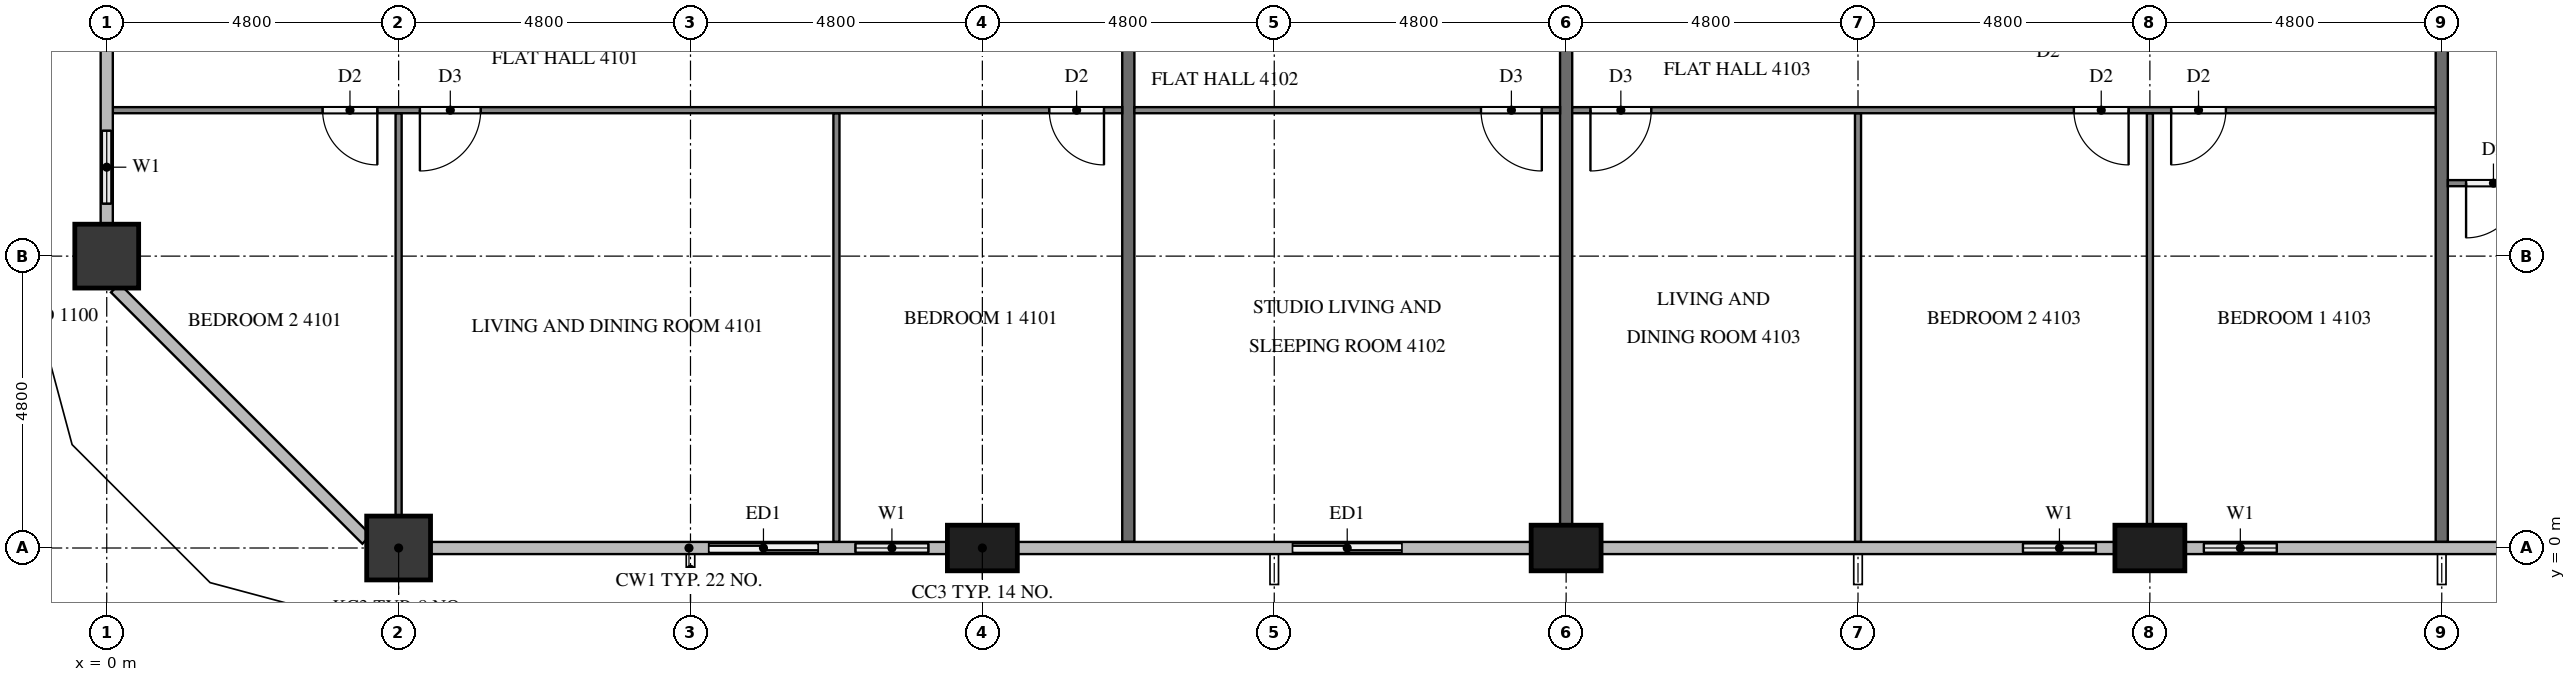
"""IFC4 building model, lengths in metres.
Left out: names, types, materials, properties, quantities, classifications, styles, units other than length and angle.
Written with IfcOpenShell. Run it as: python <this file> out.ifc"""

import sys

from ifc_helpers import new_model, si_unit, direction, frame, frame_2d, origin, origin_2d, place, context, subcontext, project, spatial, rectangle, extrude, element, fill, save


model = new_model("IFC4")
c1 = context("Model", 3, precision=1e-05, world=origin(), true_north=direction((0.0, 1.0)))
c2 = subcontext(c1, "Body", "Model", "MODEL_VIEW")
j1 = project(units=[si_unit("LENGTHUNIT", "METRE"), si_unit("PLANEANGLEUNIT", "RADIAN")], contexts=[c1])
p1 = place(None, origin())
s1 = spatial("IfcSite", under=j1, at=p1, CompositionType="ELEMENT")
p2 = place(p1, origin())
s2 = spatial("IfcBuilding", under=s1, at=p2, CompositionType="ELEMENT")
p3 = place(p2, frame((0.0, 0.0, 159.5)))
s3 = spatial("IfcBuildingStorey", under=s2, at=p3, CompositionType="ELEMENT", Elevation=159.5)
p4 = place(p3, frame((4.8, 0.0, 0.0), z_axis=(0.0, 0.0, 1.0), x_axis=(1.0, 0.0, 0.0)))
e1 = element("IfcColumn", 1, at=p4, inside=s3, PredefinedType="COLUMN", context=c2, shape_type="SweptSolid", body=[
    extrude(rectangle(XDim=1.05, YDim=1.05, at=origin_2d()), origin(), (0.0, 0.0, 1.0), 3.2),
])
for number, where, z_axis, x_axis in (
    (2, (14.4, 0.0, 0.0), (0.0, 0.0, 1.0), (1.0, 0.0, 0.0)),
    (3, (24.0, 0.0, 0.0), (0.0, 0.0, 1.0), (1.0, 0.0, 0.0)),
    (4, (33.6, 0.0, 0.0), (0.0, 0.0, 1.0), (1.0, 0.0, 0.0)),
):
    element("IfcColumn", number, at=place(p3, frame(where, z_axis=z_axis, x_axis=x_axis)), inside=s3, PredefinedType="COLUMN", context=c2, shape_type="SweptSolid", body=[
        extrude(rectangle(XDim=1.15, YDim=0.75, at=origin_2d()), origin(), (0.0, 0.0, 1.0), 3.2),
    ])
p5 = place(p3, frame((0.0, 4.8, 0.0), z_axis=(0.0, 0.0, 1.0), x_axis=(1.0, 0.0, 0.0)))
e5 = element("IfcColumn", 5, at=p5, inside=s3, PredefinedType="COLUMN", context=c2, shape_type="SweptSolid", body=[
    extrude(rectangle(XDim=1.05, YDim=1.05, at=origin_2d()), origin(), (0.0, 0.0, 1.0), 3.2),
])
p6 = place(p3, frame((9.6, 0.0, 0.0), z_axis=(0.0, 0.0, 1.0), x_axis=(1.0, 0.0, 0.0)))
e6 = element("IfcWall", 6, at=p6, inside=s3, PredefinedType="SOLIDWALL", context=c2, shape_type="SweptSolid", body=[
    extrude(rectangle(XDim=4.225, YDim=0.15, at=frame_2d((2.112, 0.0))), origin(), (0.0, 0.0, 1.0), 3.2),
])
p7 = place(p6, frame((0.3, 0.0, 0.0)))
e7 = element("IfcOpeningElement", 7, at=p7, cuts=e6, PredefinedType="OPENING", context=c2, shape_type="SweptSolid", body=[
    extrude(rectangle(XDim=1.8, YDim=2.4, at=frame_2d((0.9, 1.2))), frame((0.0, 0.085, 0.0), z_axis=(0.0, -1.0, 0.0), x_axis=(1.0, 0.0, 0.0)), (0.0, 0.0, 1.0), 0.17),
])
p8 = place(p6, frame((2.712, 0.0, 0.9)))
e8 = element("IfcOpeningElement", 8, at=p8, cuts=e6, PredefinedType="OPENING", context=c2, shape_type="SweptSolid", body=[
    extrude(rectangle(XDim=1.2, YDim=1.4, at=frame_2d((0.6, 0.7))), frame((0.0, 0.085, 0.0), z_axis=(0.0, -1.0, 0.0), x_axis=(1.0, 0.0, 0.0)), (0.0, 0.0, 1.0), 0.17),
])
p9 = place(p3, frame((19.2, 0.0, 0.0), z_axis=(0.0, 0.0, 1.0), x_axis=(1.0, 0.0, 0.0)))
e9 = element("IfcWall", 9, at=p9, inside=s3, PredefinedType="SOLIDWALL", context=c2, shape_type="SweptSolid", body=[
    extrude(rectangle(XDim=2.4, YDim=0.15, at=frame_2d((1.2, 0.0))), origin(), (0.0, 0.0, 1.0), 3.2),
])
p10 = place(p9, frame((0.3, 0.0, 0.0)))
e10 = element("IfcOpeningElement", 10, at=p10, cuts=e9, PredefinedType="OPENING", context=c2, shape_type="SweptSolid", body=[
    extrude(rectangle(XDim=1.8, YDim=2.4, at=frame_2d((0.9, 1.2))), frame((0.0, 0.085, 0.0), z_axis=(0.0, -1.0, 0.0), x_axis=(1.0, 0.0, 0.0)), (0.0, 0.0, 1.0), 0.17),
])
p11 = place(p3, frame((31.2, 0.0, 0.0), z_axis=(0.0, 0.0, 1.0), x_axis=(1.0, 0.0, 0.0)))
e11 = element("IfcWall", 11, at=p11, inside=s3, PredefinedType="SOLIDWALL", context=c2, shape_type="SweptSolid", body=[
    extrude(rectangle(XDim=1.825, YDim=0.15, at=frame_2d((0.913, 0.0))), origin(), (0.0, 0.0, 1.0), 3.2),
])
p12 = place(p11, frame((0.312, 0.0, 0.9)))
e12 = element("IfcOpeningElement", 12, at=p12, cuts=e11, PredefinedType="OPENING", context=c2, shape_type="SweptSolid", body=[
    extrude(rectangle(XDim=1.2, YDim=1.4, at=frame_2d((0.6, 0.7))), frame((0.0, 0.085, 0.0), z_axis=(0.0, -1.0, 0.0), x_axis=(1.0, 0.0, 0.0)), (0.0, 0.0, 1.0), 0.17),
])
p13 = place(p3, frame((34.175, 0.0, 0.0), z_axis=(0.0, 0.0, 1.0), x_axis=(1.0, 0.0, 0.0)))
e13 = element("IfcWall", 13, at=p13, inside=s3, PredefinedType="SOLIDWALL", context=c2, shape_type="SweptSolid", body=[
    extrude(rectangle(XDim=1.825, YDim=0.15, at=frame_2d((0.913, 0.0))), origin(), (0.0, 0.0, 1.0), 3.2),
])
p14 = place(p13, frame((0.312, 0.0, 0.9)))
e14 = element("IfcOpeningElement", 14, at=p14, cuts=e13, PredefinedType="OPENING", context=c2, shape_type="SweptSolid", body=[
    extrude(rectangle(XDim=1.2, YDim=1.4, at=frame_2d((0.6, 0.7))), frame((0.0, 0.085, 0.0), z_axis=(0.0, -1.0, 0.0), x_axis=(1.0, 0.0, 0.0)), (0.0, 0.0, 1.0), 0.17),
])
p15 = place(p3, frame((0.0, 7.2, 0.0), z_axis=(0.0, 0.0, 1.0), x_axis=(0.0, -1.0, 0.0)))
e15 = element("IfcWall", 15, at=p15, inside=s3, PredefinedType="SOLIDWALL", context=c2, shape_type="SweptSolid", body=[
    extrude(rectangle(XDim=1.875, YDim=0.15, at=frame_2d((0.938, 0.0))), origin(), (0.0, 0.0, 1.0), 3.2),
])
p16 = place(p15, frame((0.337, 0.0, 0.9)))
e16 = element("IfcOpeningElement", 16, at=p16, cuts=e15, PredefinedType="OPENING", context=c2, shape_type="SweptSolid", body=[
    extrude(rectangle(XDim=1.2, YDim=1.4, at=frame_2d((0.6, 0.7))), frame((0.0, 0.085, 0.0), z_axis=(0.0, -1.0, 0.0), x_axis=(1.0, 0.0, 0.0)), (0.0, 0.0, 1.0), 0.17),
])
p17 = place(p3, frame((16.8, 11.9, 0.0), z_axis=(0.0, 0.0, 1.0), x_axis=(0.0, -1.0, 0.0)))
e17 = element("IfcWall", 17, at=p17, inside=s3, PredefinedType="PARTITIONING", context=c2, shape_type="SweptSolid", body=[
    extrude(rectangle(XDim=11.8, YDim=0.2, at=frame_2d((5.9, 0.0))), origin(), (0.0, 0.0, 1.0), 3.2),
])
p18 = place(p3, frame((24.0, 11.9, 0.0), z_axis=(0.0, 0.0, 1.0), x_axis=(0.0, -1.0, 0.0)))
e18 = element("IfcWall", 18, at=p18, inside=s3, PredefinedType="PARTITIONING", context=c2, shape_type="SweptSolid", body=[
    extrude(rectangle(XDim=11.525, YDim=0.2, at=frame_2d((5.762, 0.0))), origin(), (0.0, 0.0, 1.0), 3.2),
])
p19 = place(p3, frame((38.4, 11.9, 0.0), z_axis=(0.0, 0.0, 1.0), x_axis=(0.0, -1.0, 0.0)))
e19 = element("IfcWall", 19, at=p19, inside=s3, PredefinedType="PARTITIONING", context=c2, shape_type="SweptSolid", body=[
    extrude(rectangle(XDim=11.8, YDim=0.2, at=frame_2d((5.9, 0.0))), origin(), (0.0, 0.0, 1.0), 3.2),
])
p20 = place(p3, frame((12.0, 7.15, 0.0), z_axis=(0.0, 0.0, 1.0), x_axis=(0.0, -1.0, 0.0)))
e20 = element("IfcWall", 20, at=p20, inside=s3, PredefinedType="PARTITIONING", context=c2, shape_type="SweptSolid", body=[
    extrude(rectangle(XDim=7.05, YDim=0.1, at=frame_2d((3.525, 0.0))), origin(), (0.0, 0.0, 1.0), 3.2),
])
p21 = place(p3, frame((4.8, 7.15, 0.0), z_axis=(0.0, 0.0, 1.0), x_axis=(0.0, -1.0, 0.0)))
e21 = element("IfcWall", 21, at=p21, inside=s3, PredefinedType="PARTITIONING", context=c2, shape_type="SweptSolid", body=[
    extrude(rectangle(XDim=6.625, YDim=0.1, at=frame_2d((3.312, 0.0))), origin(), (0.0, 0.0, 1.0), 3.2),
])
p22 = place(p3, frame((16.7, 7.2, 0.0), z_axis=(0.0, 0.0, 1.0), x_axis=(-1.0, 0.0, 0.0)))
e22 = element("IfcWall", 22, at=p22, inside=s3, PredefinedType="PARTITIONING", context=c2, shape_type="SweptSolid", body=[
    extrude(rectangle(XDim=16.6, YDim=0.1, at=frame_2d((8.3, 0.0))), origin(), (0.0, 0.0, 1.0), 3.2),
])
p23 = place(p22, frame((0.3, 0.0, 0.0)))
e23 = element("IfcOpeningElement", 23, at=p23, cuts=e22, PredefinedType="OPENING", context=c2, shape_type="SweptSolid", body=[
    extrude(rectangle(XDim=0.9, YDim=2.1, at=frame_2d((0.45, 1.05))), frame((0.0, 0.06, 0.0), z_axis=(0.0, -1.0, 0.0), x_axis=(1.0, 0.0, 0.0)), (0.0, 0.0, 1.0), 0.12),
])
p24 = place(p22, frame((10.55, 0.0, 0.0)))
e24 = element("IfcOpeningElement", 24, at=p24, cuts=e22, PredefinedType="OPENING", context=c2, shape_type="SweptSolid", body=[
    extrude(rectangle(XDim=1.0, YDim=2.1, at=frame_2d((0.5, 1.05))), frame((0.0, 0.06, 0.0), z_axis=(0.0, -1.0, 0.0), x_axis=(1.0, 0.0, 0.0)), (0.0, 0.0, 1.0), 0.12),
])
p25 = place(p22, frame((12.25, 0.0, 0.0)))
e25 = element("IfcOpeningElement", 25, at=p25, cuts=e22, PredefinedType="OPENING", context=c2, shape_type="SweptSolid", body=[
    extrude(rectangle(XDim=0.9, YDim=2.1, at=frame_2d((0.45, 1.05))), frame((0.0, 0.06, 0.0), z_axis=(0.0, -1.0, 0.0), x_axis=(1.0, 0.0, 0.0)), (0.0, 0.0, 1.0), 0.12),
])
p26 = place(p3, frame((23.9, 7.2, 0.0), z_axis=(0.0, 0.0, 1.0), x_axis=(-1.0, 0.0, 0.0)))
e26 = element("IfcWall", 26, at=p26, inside=s3, PredefinedType="PARTITIONING", context=c2, shape_type="SweptSolid", body=[
    extrude(rectangle(XDim=7.0, YDim=0.1, at=frame_2d((3.5, 0.0))), origin(), (0.0, 0.0, 1.0), 3.2),
])
p27 = place(p26, frame((0.3, 0.0, 0.0)))
e27 = element("IfcOpeningElement", 27, at=p27, cuts=e26, PredefinedType="OPENING", context=c2, shape_type="SweptSolid", body=[
    extrude(rectangle(XDim=1.0, YDim=2.1, at=frame_2d((0.5, 1.05))), frame((0.0, 0.06, 0.0), z_axis=(0.0, -1.0, 0.0), x_axis=(1.0, 0.0, 0.0)), (0.0, 0.0, 1.0), 0.12),
])
p28 = place(p3, frame((33.6, 7.15, 0.0), z_axis=(0.0, 0.0, 1.0), x_axis=(0.0, -1.0, 0.0)))
e28 = element("IfcWall", 28, at=p28, inside=s3, PredefinedType="PARTITIONING", context=c2, shape_type="SweptSolid", body=[
    extrude(rectangle(XDim=6.775, YDim=0.1, at=frame_2d((3.387, 0.0))), origin(), (0.0, 0.0, 1.0), 3.2),
])
p29 = place(p3, frame((28.8, 7.15, 0.0), z_axis=(0.0, 0.0, 1.0), x_axis=(0.0, -1.0, 0.0)))
e29 = element("IfcWall", 29, at=p29, inside=s3, PredefinedType="PARTITIONING", context=c2, shape_type="SweptSolid", body=[
    extrude(rectangle(XDim=7.05, YDim=0.1, at=frame_2d((3.525, 0.0))), origin(), (0.0, 0.0, 1.0), 3.2),
])
p30 = place(p3, frame((38.3, 7.2, 0.0), z_axis=(0.0, 0.0, 1.0), x_axis=(-1.0, 0.0, 0.0)))
e30 = element("IfcWall", 30, at=p30, inside=s3, PredefinedType="PARTITIONING", context=c2, shape_type="SweptSolid", body=[
    extrude(rectangle(XDim=14.2, YDim=0.1, at=frame_2d((7.1, 0.0))), origin(), (0.0, 0.0, 1.0), 3.2),
])
p31 = place(p30, frame((3.45, 0.0, 0.0)))
e31 = element("IfcOpeningElement", 31, at=p31, cuts=e30, PredefinedType="OPENING", context=c2, shape_type="SweptSolid", body=[
    extrude(rectangle(XDim=0.9, YDim=2.1, at=frame_2d((0.45, 1.05))), frame((0.0, 0.06, 0.0), z_axis=(0.0, -1.0, 0.0), x_axis=(1.0, 0.0, 0.0)), (0.0, 0.0, 1.0), 0.12),
])
p32 = place(p30, frame((5.05, 0.0, 0.0)))
e32 = element("IfcOpeningElement", 32, at=p32, cuts=e30, PredefinedType="OPENING", context=c2, shape_type="SweptSolid", body=[
    extrude(rectangle(XDim=0.9, YDim=2.1, at=frame_2d((0.45, 1.05))), frame((0.0, 0.06, 0.0), z_axis=(0.0, -1.0, 0.0), x_axis=(1.0, 0.0, 0.0)), (0.0, 0.0, 1.0), 0.12),
])
p33 = place(p30, frame((12.9, 0.0, 0.0)))
e33 = element("IfcOpeningElement", 33, at=p33, cuts=e30, PredefinedType="OPENING", context=c2, shape_type="SweptSolid", body=[
    extrude(rectangle(XDim=1.0, YDim=2.1, at=frame_2d((0.5, 1.05))), frame((0.0, 0.06, 0.0), z_axis=(0.0, -1.0, 0.0), x_axis=(1.0, 0.0, 0.0)), (0.0, 0.0, 1.0), 0.12),
])
p34 = place(p3, frame((57.5, 6.0, 0.0), z_axis=(0.0, 0.0, 1.0), x_axis=(-1.0, 0.0, 0.0)))
e34 = element("IfcWall", 34, at=p34, inside=s3, PredefinedType="PARTITIONING", context=c2, shape_type="SweptSolid", body=[
    extrude(rectangle(XDim=19.0, YDim=0.1, at=frame_2d((9.5, 0.0))), origin(), (0.0, 0.0, 1.0), 3.2),
])
p35 = place(p34, frame((17.8, 0.0, 0.0)))
e35 = element("IfcOpeningElement", 35, at=p35, cuts=e34, PredefinedType="OPENING", context=c2, shape_type="SweptSolid", body=[
    extrude(rectangle(XDim=0.9, YDim=2.1, at=frame_2d((0.45, 1.05))), frame((0.0, 0.06, 0.0), z_axis=(0.0, -1.0, 0.0), x_axis=(1.0, 0.0, 0.0)), (0.0, 0.0, 1.0), 0.12),
])
p36 = place(p34, frame((9.85, 0.0, 0.0)))
e36 = element("IfcOpeningElement", 36, at=p36, cuts=e34, PredefinedType="OPENING", context=c2, shape_type="SweptSolid", body=[
    extrude(rectangle(XDim=1.0, YDim=2.1, at=frame_2d((0.5, 1.05))), frame((0.0, 0.06, 0.0), z_axis=(0.0, -1.0, 0.0), x_axis=(1.0, 0.0, 0.0)), (0.0, 0.0, 1.0), 0.12),
])
p37 = place(p34, frame((8.25, 0.0, 0.0)))
e37 = element("IfcOpeningElement", 37, at=p37, cuts=e34, PredefinedType="OPENING", context=c2, shape_type="SweptSolid", body=[
    extrude(rectangle(XDim=0.9, YDim=2.1, at=frame_2d((0.45, 1.05))), frame((0.0, 0.06, 0.0), z_axis=(0.0, -1.0, 0.0), x_axis=(1.0, 0.0, 0.0)), (0.0, 0.0, 1.0), 0.12),
])
p38 = place(p34, frame((0.5, 0.0, 0.0)))
e38 = element("IfcOpeningElement", 38, at=p38, cuts=e34, PredefinedType="OPENING", context=c2, shape_type="SweptSolid", body=[
    extrude(rectangle(XDim=0.9, YDim=2.1, at=frame_2d((0.45, 1.05))), frame((0.0, 0.06, 0.0), z_axis=(0.0, -1.0, 0.0), x_axis=(1.0, 0.0, 0.0)), (0.0, 0.0, 1.0), 0.12),
])
p39 = place(p7, origin())
e39 = element("IfcDoor", 39, at=p39, inside=s3, OperationType="SLIDING_TO_LEFT", PredefinedType="DOOR", context=c2, shape_type="SweptSolid", body=[
    extrude(rectangle(XDim=1.8, YDim=2.4, at=frame_2d((0.9, 1.2))), frame((0.0, 0.025, 0.0), z_axis=(0.0, -1.0, 0.0), x_axis=(1.0, 0.0, 0.0)), (0.0, 0.0, 1.0), 0.05),
])
fill(e7, e39)
p40 = place(p8, origin())
e40 = element("IfcWindow", 40, at=p40, inside=s3, PartitioningType="SINGLE_PANEL", PredefinedType="WINDOW", context=c2, shape_type="SweptSolid", body=[
    extrude(rectangle(XDim=1.2, YDim=1.4, at=frame_2d((0.6, 0.7))), frame((0.0, 0.03, 0.0), z_axis=(0.0, -1.0, 0.0), x_axis=(1.0, 0.0, 0.0)), (0.0, 0.0, 1.0), 0.06),
])
fill(e8, e40)
p41 = place(p10, origin())
e41 = element("IfcDoor", 41, at=p41, inside=s3, OperationType="SLIDING_TO_RIGHT", PredefinedType="DOOR", context=c2, shape_type="SweptSolid", body=[
    extrude(rectangle(XDim=1.8, YDim=2.4, at=frame_2d((0.9, 1.2))), frame((0.0, 0.025, 0.0), z_axis=(0.0, -1.0, 0.0), x_axis=(1.0, 0.0, 0.0)), (0.0, 0.0, 1.0), 0.05),
])
fill(e10, e41)
p42 = place(p12, origin())
e42 = element("IfcWindow", 42, at=p42, inside=s3, PartitioningType="SINGLE_PANEL", PredefinedType="WINDOW", context=c2, shape_type="SweptSolid", body=[
    extrude(rectangle(XDim=1.2, YDim=1.4, at=frame_2d((0.6, 0.7))), frame((0.0, 0.03, 0.0), z_axis=(0.0, -1.0, 0.0), x_axis=(1.0, 0.0, 0.0)), (0.0, 0.0, 1.0), 0.06),
])
fill(e12, e42)
p43 = place(p14, origin())
e43 = element("IfcWindow", 43, at=p43, inside=s3, PartitioningType="SINGLE_PANEL", PredefinedType="WINDOW", context=c2, shape_type="SweptSolid", body=[
    extrude(rectangle(XDim=1.2, YDim=1.4, at=frame_2d((0.6, 0.7))), frame((0.0, 0.03, 0.0), z_axis=(0.0, -1.0, 0.0), x_axis=(1.0, 0.0, 0.0)), (0.0, 0.0, 1.0), 0.06),
])
fill(e14, e43)
p44 = place(p16, origin())
e44 = element("IfcWindow", 44, at=p44, inside=s3, PartitioningType="SINGLE_PANEL", PredefinedType="WINDOW", context=c2, shape_type="SweptSolid", body=[
    extrude(rectangle(XDim=1.2, YDim=1.4, at=frame_2d((0.6, 0.7))), frame((0.0, 0.03, 0.0), z_axis=(0.0, -1.0, 0.0), x_axis=(1.0, 0.0, 0.0)), (0.0, 0.0, 1.0), 0.06),
])
fill(e16, e44)
p45 = place(p23, origin())
e45 = element("IfcDoor", 45, at=p45, inside=s3, OperationType="SINGLE_SWING_LEFT", PredefinedType="DOOR", context=c2, shape_type="SweptSolid", body=[
    extrude(rectangle(XDim=0.9, YDim=2.1, at=frame_2d((0.45, 1.05))), frame((0.0, 0.025, 0.0), z_axis=(0.0, -1.0, 0.0), x_axis=(1.0, 0.0, 0.0)), (0.0, 0.0, 1.0), 0.05),
])
fill(e23, e45)
p46 = place(p24, origin())
e46 = element("IfcDoor", 46, at=p46, inside=s3, OperationType="SINGLE_SWING_RIGHT", PredefinedType="DOOR", context=c2, shape_type="SweptSolid", body=[
    extrude(rectangle(XDim=1.0, YDim=2.1, at=frame_2d((0.5, 1.05))), frame((0.0, 0.025, 0.0), z_axis=(0.0, -1.0, 0.0), x_axis=(1.0, 0.0, 0.0)), (0.0, 0.0, 1.0), 0.05),
])
fill(e24, e46)
p47 = place(p25, origin())
e47 = element("IfcDoor", 47, at=p47, inside=s3, OperationType="SINGLE_SWING_LEFT", PredefinedType="DOOR", context=c2, shape_type="SweptSolid", body=[
    extrude(rectangle(XDim=0.9, YDim=2.1, at=frame_2d((0.45, 1.05))), frame((0.0, 0.025, 0.0), z_axis=(0.0, -1.0, 0.0), x_axis=(1.0, 0.0, 0.0)), (0.0, 0.0, 1.0), 0.05),
])
fill(e25, e47)
p48 = place(p27, origin())
e48 = element("IfcDoor", 48, at=p48, inside=s3, OperationType="SINGLE_SWING_LEFT", PredefinedType="DOOR", context=c2, shape_type="SweptSolid", body=[
    extrude(rectangle(XDim=1.0, YDim=2.1, at=frame_2d((0.5, 1.05))), frame((0.0, 0.025, 0.0), z_axis=(0.0, -1.0, 0.0), x_axis=(1.0, 0.0, 0.0)), (0.0, 0.0, 1.0), 0.05),
])
fill(e27, e48)
p49 = place(p31, origin())
e49 = element("IfcDoor", 49, at=p49, inside=s3, OperationType="SINGLE_SWING_RIGHT", PredefinedType="DOOR", context=c2, shape_type="SweptSolid", body=[
    extrude(rectangle(XDim=0.9, YDim=2.1, at=frame_2d((0.45, 1.05))), frame((0.0, 0.025, 0.0), z_axis=(0.0, -1.0, 0.0), x_axis=(1.0, 0.0, 0.0)), (0.0, 0.0, 1.0), 0.05),
])
fill(e31, e49)
p50 = place(p32, origin())
e50 = element("IfcDoor", 50, at=p50, inside=s3, OperationType="SINGLE_SWING_LEFT", PredefinedType="DOOR", context=c2, shape_type="SweptSolid", body=[
    extrude(rectangle(XDim=0.9, YDim=2.1, at=frame_2d((0.45, 1.05))), frame((0.0, 0.025, 0.0), z_axis=(0.0, -1.0, 0.0), x_axis=(1.0, 0.0, 0.0)), (0.0, 0.0, 1.0), 0.05),
])
fill(e32, e50)
p51 = place(p33, origin())
e51 = element("IfcDoor", 51, at=p51, inside=s3, OperationType="SINGLE_SWING_RIGHT", PredefinedType="DOOR", context=c2, shape_type="SweptSolid", body=[
    extrude(rectangle(XDim=1.0, YDim=2.1, at=frame_2d((0.5, 1.05))), frame((0.0, 0.025, 0.0), z_axis=(0.0, -1.0, 0.0), x_axis=(1.0, 0.0, 0.0)), (0.0, 0.0, 1.0), 0.05),
])
fill(e33, e51)
p52 = place(p35, origin())
e52 = element("IfcDoor", 52, at=p52, inside=s3, OperationType="SINGLE_SWING_RIGHT", PredefinedType="DOOR", context=c2, shape_type="SweptSolid", body=[
    extrude(rectangle(XDim=0.9, YDim=2.1, at=frame_2d((0.45, 1.05))), frame((0.0, 0.025, 0.0), z_axis=(0.0, -1.0, 0.0), x_axis=(1.0, 0.0, 0.0)), (0.0, 0.0, 1.0), 0.05),
])
fill(e35, e52)
save(model, sys.argv[1])
